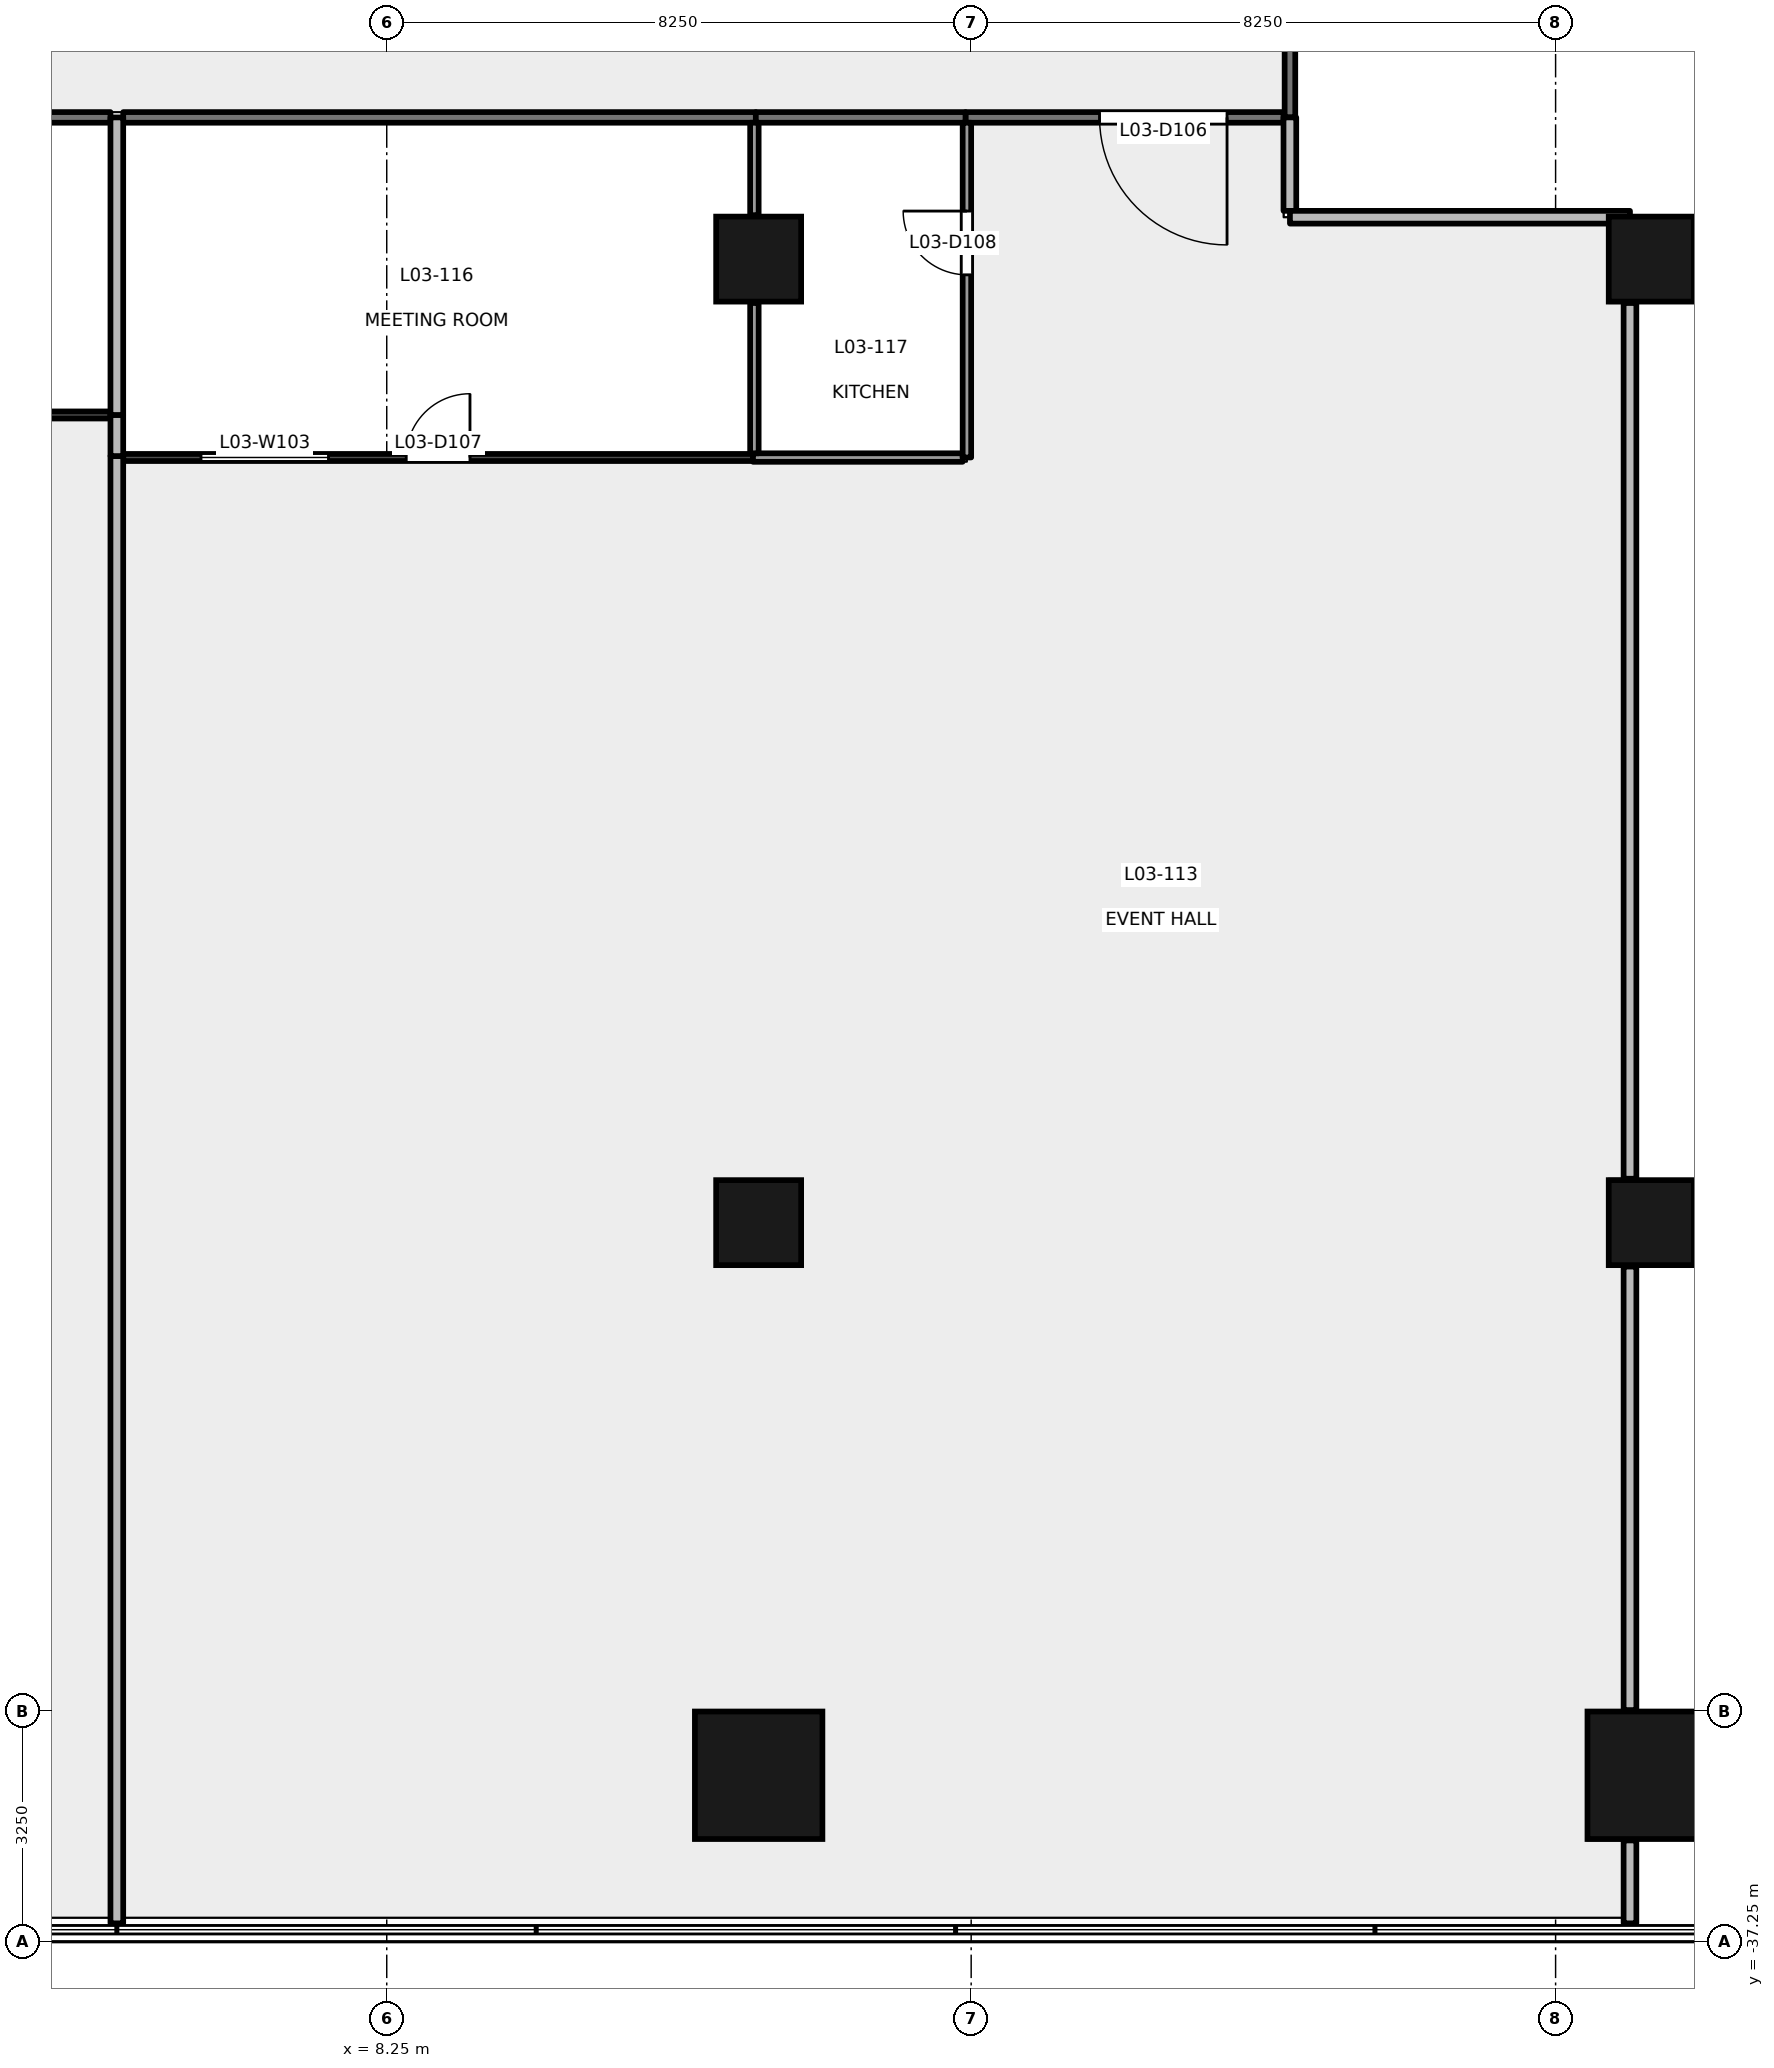
"""IFC4 building model, lengths in metres.
Left out: names, types, materials, properties, quantities, classifications, styles, units other than length and angle.
Written with IfcOpenShell. Run it as: python <this file> out.ifc"""

import sys

from ifc_helpers import new_model, si_unit, direction, frame, frame_2d, origin, origin_2d, place, context, subcontext, project, spatial, rectangle, extrude, element, fill, save


model = new_model("IFC4")
c1 = context("Model", 3, precision=1e-05, world=origin(), true_north=direction((0.0, 1.0)))
c2 = subcontext(c1, "Body", "Model", "MODEL_VIEW")
j1 = project(units=[si_unit("LENGTHUNIT", "METRE"), si_unit("PLANEANGLEUNIT", "RADIAN")], contexts=[c1])
p1 = place(None, origin())
s1 = spatial("IfcSite", under=j1, at=p1, CompositionType="ELEMENT")
p2 = place(p1, origin())
s2 = spatial("IfcBuilding", under=s1, at=p2, CompositionType="ELEMENT")
p3 = place(p2, frame((0.0, 0.0, 17.4)))
s3 = spatial("IfcBuildingStorey", under=s2, at=p3, CompositionType="ELEMENT", Elevation=17.4)
for number, where, z_axis, x_axis in (
    (1, (13.5, -34.9, -0.2), (0.0, 0.0, 1.0), (1.0, 0.0, 0.0)),
    (2, (26.1, -34.9, -0.2), (0.0, 0.0, 1.0), (1.0, 0.0, 0.0)),
):
    element("IfcColumn", number, at=place(p3, frame(where, z_axis=z_axis, x_axis=x_axis)), inside=s3, PredefinedType="COLUMN", context=c2, shape_type="SweptSolid", body=[
        extrude(rectangle(XDim=1.8, YDim=1.8, at=origin_2d()), origin(), (0.0, 0.0, 1.0), 4.8),
    ])
for number, where, z_axis, x_axis in (
    (3, (13.5, -27.1, -0.2), (0.0, 0.0, 1.0), (1.0, 0.0, 0.0)),
    (4, (26.1, -27.1, -0.2), (0.0, 0.0, 1.0), (1.0, 0.0, 0.0)),
    (5, (13.5, -13.5, -0.2), (0.0, 0.0, 1.0), (1.0, 0.0, 0.0)),
    (6, (26.1, -13.5, -0.2), (0.0, 0.0, 1.0), (1.0, 0.0, 0.0)),
):
    element("IfcColumn", number, at=place(p3, frame(where, z_axis=z_axis, x_axis=x_axis)), inside=s3, PredefinedType="COLUMN", context=c2, shape_type="SweptSolid", body=[
        extrude(rectangle(XDim=1.2, YDim=1.2, at=origin_2d()), origin(), (0.0, 0.0, 1.0), 4.8),
    ])
p4 = place(p3, frame((4.35, -11.5, 0.0), z_axis=(0.0, 0.0, 1.0), x_axis=(-1.0, 0.0, 0.0)))
e7 = element("IfcWall", 7, at=p4, inside=s3, PredefinedType="PARTITIONING", context=c2, shape_type="SweptSolid", body=[
    extrude(rectangle(XDim=4.23, YDim=0.15, at=frame_2d((2.115, 0.0))), origin(), (0.0, 0.0, 1.0), 3.2),
])
p5 = place(p3, frame((20.909, -11.5, 0.0), z_axis=(0.0, 0.0, 1.0), x_axis=(-1.0, 0.0, 0.0)))
e8 = element("IfcWall", 8, at=p5, inside=s3, PredefinedType="PARTITIONING", context=c2, shape_type="SweptSolid", body=[
    extrude(rectangle(XDim=4.489, YDim=0.15, at=frame_2d((2.245, 0.0))), origin(), (0.0, 0.0, 1.0), 4.3),
])
p6 = place(p5, frame((0.797, 0.0, 0.0)))
e9 = element("IfcOpeningElement", 9, at=p6, cuts=e8, PredefinedType="OPENING", context=c2, shape_type="SweptSolid", body=[
    extrude(rectangle(XDim=1.8, YDim=2.1, at=frame_2d((0.9, 1.05))), frame((0.0, 0.085, 0.0), z_axis=(0.0, -1.0, 0.0), x_axis=(1.0, 0.0, 0.0)), (0.0, 0.0, 1.0), 0.171),
])
p7 = place(p3, frame((13.46, -11.5, 0.0), z_axis=(0.0, 0.0, 1.0), x_axis=(-1.0, 0.0, 0.0)))
e10 = element("IfcWall", 10, at=p7, inside=s3, PredefinedType="PARTITIONING", context=c2, shape_type="SweptSolid", body=[
    extrude(rectangle(XDim=8.93, YDim=0.15, at=frame_2d((4.465, 0.0))), origin(), (0.0, 0.0, 1.0), 3.2),
])
p8 = place(p3, frame((16.42, -11.5, 0.0), z_axis=(0.0, 0.0, 1.0), x_axis=(-1.0, 0.0, 0.0)))
e11 = element("IfcWall", 11, at=p8, inside=s3, PredefinedType="PARTITIONING", context=c2, shape_type="SweptSolid", body=[
    extrude(rectangle(XDim=2.96, YDim=0.15, at=frame_2d((1.48, 0.0))), origin(), (0.0, 0.0, 1.0), 3.2),
])
p9 = place(p3, frame((21.0, -7.4, 0.0), z_axis=(0.0, 0.0, 1.0), x_axis=(0.0, -1.0, 0.0)))
e12 = element("IfcWall", 12, at=p9, inside=s3, PredefinedType="PARTITIONING", context=c2, shape_type="SweptSolid", body=[
    extrude(rectangle(XDim=4.1, YDim=0.15, at=frame_2d((2.05, 0.0))), origin(), (0.0, 0.0, 1.0), 4.6),
])
p10 = place(p9, frame((1.15, 0.0, 0.0)))
e13 = element("IfcOpeningElement", 13, at=p10, cuts=e12, PredefinedType="OPENING", context=c2, shape_type="SweptSolid", body=[
    extrude(rectangle(XDim=1.8, YDim=2.1, at=frame_2d((0.9, 1.05))), frame((0.0, 0.085, 0.0), z_axis=(0.0, -1.0, 0.0), x_axis=(1.0, 0.0, 0.0)), (0.0, 0.0, 1.0), 0.171),
])
p11 = place(p3, frame((0.16, -15.7, 0.0), z_axis=(0.0, 0.0, 1.0), x_axis=(1.0, 0.0, 0.0)))
e14 = element("IfcWall", 14, at=p11, inside=s3, PredefinedType="PARTITIONING", context=c2, shape_type="SweptSolid", body=[
    extrude(rectangle(XDim=4.19, YDim=0.1, at=frame_2d((2.095, 0.0))), origin(), (0.0, 0.0, 1.0), 3.6),
])
p12 = place(p11, frame((2.203, 0.0, 0.0)))
e15 = element("IfcOpeningElement", 15, at=p12, cuts=e14, PredefinedType="OPENING", context=c2, shape_type="SweptSolid", body=[
    extrude(rectangle(XDim=0.9, YDim=2.1, at=frame_2d((0.45, 1.05))), frame((0.0, 0.061, 0.0), z_axis=(0.0, -1.0, 0.0), x_axis=(1.0, 0.0, 0.0)), (0.0, 0.0, 1.0), 0.121),
])
p13 = place(p11, frame((0.521, 0.0, 0.9)))
e16 = element("IfcOpeningElement", 16, at=p13, cuts=e14, PredefinedType="OPENING", context=c2, shape_type="SweptSolid", body=[
    extrude(rectangle(XDim=1.2, YDim=1.2, at=frame_2d((0.6, 0.6))), frame((0.0, 0.061, 0.0), z_axis=(0.0, -1.0, 0.0), x_axis=(1.0, 0.0, 0.0)), (0.0, 0.0, 1.0), 0.121),
])
p14 = place(p3, frame((4.44, -16.28, 0.0), z_axis=(0.0, 0.0, 1.0), x_axis=(0.0, -1.0, 0.0)))
e17 = element("IfcWall", 17, at=p14, inside=s3, PredefinedType="PARTITIONING", context=c2, shape_type="SweptSolid", body=[
    extrude(rectangle(XDim=20.71, YDim=0.18, at=frame_2d((10.355, 0.0))), origin(), (0.0, 0.0, 1.0), 3.6),
])
p15 = place(p3, frame((4.44, -15.7, 0.0), z_axis=(0.0, 0.0, 1.0), x_axis=(0.0, -1.0, 0.0)))
e18 = element("IfcWall", 18, at=p15, inside=s3, PredefinedType="PARTITIONING", context=c2, shape_type="SweptSolid", body=[
    extrude(rectangle(XDim=0.58, YDim=0.18, at=frame_2d((0.29, 0.0))), origin(), (0.0, 0.0, 1.0), 3.99),
])
p16 = place(p3, frame((4.44, -11.5, 0.0), z_axis=(0.0, 0.0, 1.0), x_axis=(0.0, -1.0, 0.0)))
e19 = element("IfcWall", 19, at=p16, inside=s3, PredefinedType="PARTITIONING", context=c2, shape_type="SweptSolid", body=[
    extrude(rectangle(XDim=4.2, YDim=0.18, at=frame_2d((2.1, 0.0))), origin(), (0.0, 0.0, 1.0), 3.6),
])
p17 = place(p3, frame((4.53, -16.3, 0.0), z_axis=(0.0, 0.0, 1.0), x_axis=(1.0, 0.0, 0.0)))
e20 = element("IfcWall", 20, at=p17, inside=s3, PredefinedType="PARTITIONING", context=c2, shape_type="SweptSolid", body=[
    extrude(rectangle(XDim=8.89, YDim=0.1, at=frame_2d((4.445, 0.0))), origin(), (0.0, 0.0, 1.0), 3.6),
])
p18 = place(p17, frame((3.995, 0.0, 0.0)))
e21 = element("IfcOpeningElement", 21, at=p18, cuts=e20, PredefinedType="OPENING", context=c2, shape_type="SweptSolid", body=[
    extrude(rectangle(XDim=0.9, YDim=2.1, at=frame_2d((0.45, 1.05))), frame((0.0, 0.061, 0.0), z_axis=(0.0, -1.0, 0.0), x_axis=(1.0, 0.0, 0.0)), (0.0, 0.0, 1.0), 0.121),
])
p19 = place(p17, frame((1.098, 0.0, 0.9)))
e22 = element("IfcOpeningElement", 22, at=p19, cuts=e20, PredefinedType="OPENING", context=c2, shape_type="SweptSolid", body=[
    extrude(rectangle(XDim=1.8, YDim=1.2, at=frame_2d((0.9, 0.6))), frame((0.0, 0.061, 0.0), z_axis=(0.0, -1.0, 0.0), x_axis=(1.0, 0.0, 0.0)), (0.0, 0.0, 1.0), 0.121),
])
p20 = place(p3, frame((13.42, -16.301, 0.0), z_axis=(0.0, 0.0, 1.0), x_axis=(1.0, 0.0, 0.0)))
e23 = element("IfcWall", 23, at=p20, inside=s3, PredefinedType="PARTITIONING", context=c2, shape_type="SweptSolid", body=[
    extrude(rectangle(XDim=2.96, YDim=0.12, at=frame_2d((1.48, 0.0))), origin(), (0.0, 0.0, 1.0), 3.6),
])
p21 = place(p3, frame((16.44, -16.3, 0.0), z_axis=(0.0, 0.0, 1.0), x_axis=(0.0, 1.0, 0.0)))
e24 = element("IfcWall", 24, at=p21, inside=s3, PredefinedType="PARTITIONING", context=c2, shape_type="SweptSolid", body=[
    extrude(rectangle(XDim=4.725, YDim=0.12, at=frame_2d((2.363, 0.0))), origin(), (0.0, 0.0, 1.0), 3.6),
])
p22 = place(p21, frame((2.578, 0.0, 0.0)))
e25 = element("IfcOpeningElement", 25, at=p22, cuts=e24, PredefinedType="OPENING", context=c2, shape_type="SweptSolid", body=[
    extrude(rectangle(XDim=0.9, YDim=2.1, at=frame_2d((0.45, 1.05))), frame((0.0, 0.071, 0.0), z_axis=(0.0, -1.0, 0.0), x_axis=(1.0, 0.0, 0.0)), (0.0, 0.0, 1.0), 0.141),
])
p23 = place(p3, frame((20.999, -11.5, 0.0), z_axis=(0.0, 0.0, 1.0), x_axis=(0.0, -1.0, 0.0)))
e26 = element("IfcWall", 26, at=p23, inside=s3, PredefinedType="PARTITIONING", context=c2, shape_type="SweptSolid", body=[
    extrude(rectangle(XDim=1.319, YDim=0.18, at=frame_2d((0.66, 0.0))), origin(), (0.0, 0.0, 1.0), 4.6),
])
p24 = place(p3, frame((21.0, -12.909, 0.0), z_axis=(0.0, 0.0, 1.0), x_axis=(1.0, 0.0, 0.0)))
e27 = element("IfcWall", 27, at=p24, inside=s3, PredefinedType="PARTITIONING", context=c2, shape_type="SweptSolid", body=[
    extrude(rectangle(XDim=4.8, YDim=0.18, at=frame_2d((2.4, 0.0))), origin(), (0.0, 0.0, 1.0), 4.3),
])
p25 = place(p3, frame((25.8, -35.82, 0.0), z_axis=(0.0, 0.0, 1.0), x_axis=(0.0, -1.0, 0.0)))
e28 = element("IfcWall", 28, at=p25, inside=s3, PredefinedType="PARTITIONING", context=c2, shape_type="SweptSolid", body=[
    extrude(rectangle(XDim=1.17, YDim=0.18, at=frame_2d((0.585, 0.0))), origin(), (0.0, 0.0, 1.0), 4.6),
])
p26 = place(p3, frame((25.8, -27.72, 0.0), z_axis=(0.0, 0.0, 1.0), x_axis=(0.0, -1.0, 0.0)))
e29 = element("IfcWall", 29, at=p26, inside=s3, PredefinedType="PARTITIONING", context=c2, shape_type="SweptSolid", body=[
    extrude(rectangle(XDim=6.26, YDim=0.18, at=frame_2d((3.13, 0.0))), origin(), (0.0, 0.0, 1.0), 4.6),
])
p27 = place(p3, frame((25.8, -14.12, 0.0), z_axis=(0.0, 0.0, 1.0), x_axis=(0.0, -1.0, 0.0)))
e30 = element("IfcWall", 30, at=p27, inside=s3, PredefinedType="PARTITIONING", context=c2, shape_type="SweptSolid", body=[
    extrude(rectangle(XDim=12.36, YDim=0.18, at=frame_2d((6.18, 0.0))), origin(), (0.0, 0.0, 1.0), 4.6),
])
p28 = place(p3, frame((13.44, -14.12, 0.0), z_axis=(0.0, 0.0, 1.0), x_axis=(0.0, -1.0, 0.0)))
e31 = element("IfcWall", 31, at=p28, inside=s3, PredefinedType="PARTITIONING", context=c2, shape_type="SweptSolid", body=[
    extrude(rectangle(XDim=2.121, YDim=0.12, at=frame_2d((1.061, 0.0))), origin(), (0.0, 0.0, 1.0), 3.6),
])
p29 = place(p3, frame((13.44, -11.575, 0.0), z_axis=(0.0, 0.0, 1.0), x_axis=(0.0, -1.0, 0.0)))
e32 = element("IfcWall", 32, at=p29, inside=s3, PredefinedType="PARTITIONING", context=c2, shape_type="SweptSolid", body=[
    extrude(rectangle(XDim=1.305, YDim=0.12, at=frame_2d((0.652, 0.0))), origin(), (0.0, 0.0, 1.0), 3.2),
])
p30 = place(p6, origin())
e33 = element("IfcDoor", 33, at=p30, inside=s3, OperationType="DOUBLE_DOOR_SINGLE_SWING", PredefinedType="DOOR", context=c2, shape_type="SweptSolid", body=[
    extrude(rectangle(XDim=1.8, YDim=2.1, at=frame_2d((0.9, 1.05))), frame((0.0, 0.025, 0.0), z_axis=(0.0, -1.0, 0.0), x_axis=(1.0, 0.0, 0.0)), (0.0, 0.0, 1.0), 0.05),
])
fill(e9, e33)
p31 = place(p18, origin())
e34 = element("IfcDoor", 34, at=p31, inside=s3, OperationType="SINGLE_SWING_RIGHT", PredefinedType="DOOR", context=c2, shape_type="SweptSolid", body=[
    extrude(rectangle(XDim=0.9, YDim=2.1, at=frame_2d((0.45, 1.05))), frame((0.0, 0.025, 0.0), z_axis=(0.0, -1.0, 0.0), x_axis=(1.0, 0.0, 0.0)), (0.0, 0.0, 1.0), 0.05),
])
fill(e21, e34)
p32 = place(p22, origin())
e35 = element("IfcDoor", 35, at=p32, inside=s3, OperationType="SINGLE_SWING_RIGHT", PredefinedType="DOOR", context=c2, shape_type="SweptSolid", body=[
    extrude(rectangle(XDim=0.9, YDim=2.1, at=frame_2d((0.45, 1.05))), frame((0.0, 0.025, 0.0), z_axis=(0.0, -1.0, 0.0), x_axis=(1.0, 0.0, 0.0)), (0.0, 0.0, 1.0), 0.05),
])
fill(e25, e35)
p33 = place(p19, origin())
e36 = element("IfcWindow", 36, at=p33, inside=s3, PartitioningType="SINGLE_PANEL", PredefinedType="WINDOW", context=c2, shape_type="SweptSolid", body=[
    extrude(rectangle(XDim=1.8, YDim=1.2, at=frame_2d((0.9, 0.6))), frame((0.0, 0.03, 0.0), z_axis=(0.0, -1.0, 0.0), x_axis=(1.0, 0.0, 0.0)), (0.0, 0.0, 1.0), 0.06),
])
fill(e22, e36)
save(model, sys.argv[1])
